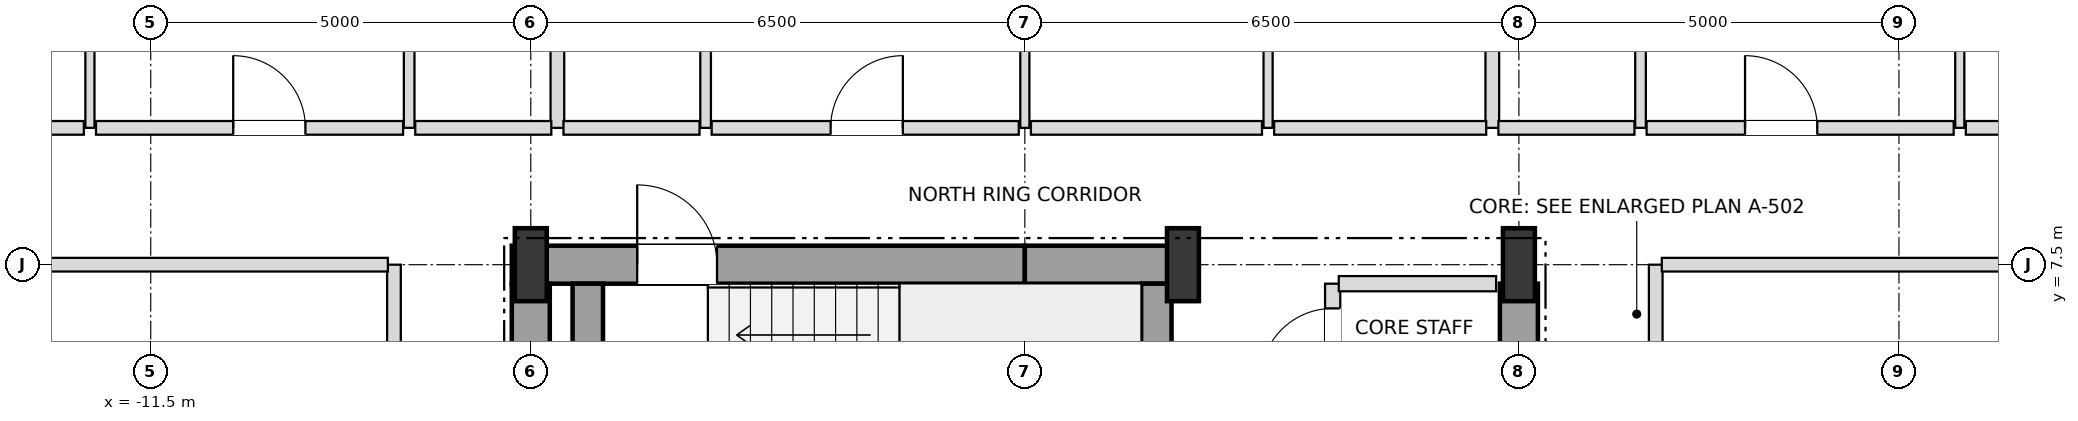
"""IFC4 building model, lengths in metres.
Left out: names, types, materials, properties, quantities, classifications, styles, units other than length and angle.
Written with IfcOpenShell. Run it as: python <this file> out.ifc"""

import sys

from ifc_helpers import new_model, si_unit, direction, frame, frame_2d, origin, origin_2d, place, context, subcontext, project, spatial, rectangle, i_section, extrude, element, fill, save


model = new_model("IFC4")
c1 = context("Model", 3, precision=1e-05, world=origin(), true_north=direction((0.0, 1.0)))
c2 = subcontext(c1, "Body", "Model", "MODEL_VIEW")
j1 = project(units=[si_unit("LENGTHUNIT", "METRE"), si_unit("PLANEANGLEUNIT", "RADIAN")], contexts=[c1])
p1 = place(None, origin())
s1 = spatial("IfcSite", under=j1, at=p1, CompositionType="ELEMENT")
p2 = place(p1, origin())
s2 = spatial("IfcBuilding", under=s1, at=p2, CompositionType="ELEMENT")
p3 = place(p2, frame((0.0, 0.0, 46.8)))
s3 = spatial("IfcBuildingStorey", under=s2, at=p3, CompositionType="ELEMENT", Elevation=46.8)
for number, where, z_axis, x_axis in (
    (1, (-6.5, 7.5, 0.0), (0.0, 0.0, 1.0), (1.0, 0.0, 0.0)),
    (2, (2.08, 7.5, 0.0), (0.0, 0.0, 1.0), (1.0, 0.0, 0.0)),
    (3, (6.5, 7.5, 0.0), (0.0, 0.0, 1.0), (1.0, 0.0, 0.0)),
):
    element("IfcColumn", number, at=place(p3, frame(where, z_axis=z_axis, x_axis=x_axis)), inside=s3, PredefinedType="COLUMN", context=c2, shape_type="SweptSolid", body=[
        extrude(i_section(OverallWidth=0.42, OverallDepth=0.96, WebThickness=0.022, FlangeThickness=0.034, at=origin_2d()), origin(), (0.0, 0.0, 1.0), 3.6),
    ])
p4 = place(p3, frame((-6.75, 7.5, 0.0), z_axis=(0.0, 0.0, 1.0), x_axis=(1.0, 0.0, 0.0)))
e4 = element("IfcWall", 4, at=p4, inside=s3, PredefinedType="SHEAR", context=c2, shape_type="SweptSolid", body=[
    extrude(rectangle(XDim=6.75, YDim=0.5, at=frame_2d((3.375, 0.0))), origin(), (0.0, 0.0, 1.0), 3.38),
])
p5 = place(p4, frame((1.65, 0.0, 0.0)))
e5 = element("IfcOpeningElement", 5, at=p5, cuts=e4, PredefinedType="OPENING", context=c2, shape_type="SweptSolid", body=[
    extrude(rectangle(XDim=1.05, YDim=2.15, at=frame_2d((0.525, 1.075))), frame((0.0, 0.26, 0.0), z_axis=(0.0, -1.0, 0.0), x_axis=(1.0, 0.0, 0.0)), (0.0, 0.0, 1.0), 0.52),
])
p6 = place(p3, frame((0.0, 7.5, 0.0), z_axis=(0.0, 0.0, 1.0), x_axis=(1.0, 0.0, 0.0)))
e6 = element("IfcWall", 6, at=p6, inside=s3, PredefinedType="SHEAR", context=c2, shape_type="SweptSolid", body=[
    extrude(rectangle(XDim=2.08, YDim=0.5, at=frame_2d((1.04, 0.0))), origin(), (0.0, 0.0, 1.0), 3.38),
])
for number, where, z_axis, x_axis in (
    (7, (-6.5, 3.95, 0.0), (0.0, 0.0, 1.0), (0.0, 1.0, 0.0)),
    (8, (6.5, 3.95, 0.0), (0.0, 0.0, 1.0), (0.0, 1.0, 0.0)),
):
    element("IfcWall", number, at=place(p3, frame(where, z_axis=z_axis, x_axis=x_axis)), inside=s3, PredefinedType="SHEAR", context=c2, shape_type="SweptSolid", body=[
        extrude(rectangle(XDim=3.3, YDim=0.5, at=frame_2d((1.65, 0.0))), origin(), (0.0, 0.0, 1.0), 3.38),
    ])
for number, where, z_axis, x_axis in (
    (9, (1.73, 3.95, 0.0), (0.0, 0.0, 1.0), (0.0, 1.0, 0.0)),
    (10, (-5.75, 3.95, 0.0), (0.0, 0.0, 1.0), (0.0, 1.0, 0.0)),
):
    element("IfcWall", number, at=place(p3, frame(where, z_axis=z_axis, x_axis=x_axis)), inside=s3, PredefinedType="SHEAR", context=c2, shape_type="SweptSolid", body=[
        extrude(rectangle(XDim=3.3, YDim=0.4, at=frame_2d((1.65, 0.0))), origin(), (0.0, 0.0, 1.0), 3.38),
    ])
p7 = place(p3, frame((-12.3, 9.3, 0.0), z_axis=(0.0, 0.0, 1.0), x_axis=(0.0, 1.0, 0.0)))
e11 = element("IfcWall", 11, at=p7, inside=s3, PredefinedType="PARTITIONING", context=c2, shape_type="SweptSolid", body=[
    extrude(rectangle(XDim=15.6, YDim=0.12, at=frame_2d((7.8, 0.0))), origin(), (0.0, 0.0, 1.0), 2.736),
])
p8 = place(p7, frame((4.325, 0.0, 0.0)))
e12 = element("IfcOpeningElement", 12, at=p8, cuts=e11, PredefinedType="OPENING", context=c2, shape_type="SweptSolid", body=[
    extrude(rectangle(XDim=0.95, YDim=2.1, at=frame_2d((0.475, 1.05))), frame((0.0, 0.07, 0.0), z_axis=(0.0, -1.0, 0.0), x_axis=(1.0, 0.0, 0.0)), (0.0, 0.0, 1.0), 0.14),
])
p9 = place(p7, frame((12.15, 0.0, 0.0)))
e13 = element("IfcOpeningElement", 13, at=p9, cuts=e11, PredefinedType="OPENING", context=c2, shape_type="SweptSolid", body=[
    extrude(rectangle(XDim=0.9, YDim=2.1, at=frame_2d((0.45, 1.05))), frame((0.0, 0.07, 0.0), z_axis=(0.0, -1.0, 0.0), x_axis=(1.0, 0.0, 0.0)), (0.0, 0.0, 1.0), 0.14),
])
p10 = place(p3, frame((-8.3, -7.5, 0.0), z_axis=(0.0, 0.0, 1.0), x_axis=(0.0, 1.0, 0.0)))
e14 = element("IfcWall", 14, at=p10, inside=s3, PredefinedType="PARTITIONING", context=c2, shape_type="SweptSolid", body=[
    extrude(rectangle(XDim=15.0, YDim=0.18, at=frame_2d((7.5, 0.0))), origin(), (0.0, 0.0, 1.0), 3.38),
])
p11 = place(p10, frame((3.475, 0.0, 0.0)))
e15 = element("IfcOpeningElement", 15, at=p11, cuts=e14, PredefinedType="OPENING", context=c2, shape_type="SweptSolid", body=[
    extrude(rectangle(XDim=0.95, YDim=2.15, at=frame_2d((0.475, 1.075))), frame((0.0, 0.1, 0.0), z_axis=(0.0, -1.0, 0.0), x_axis=(1.0, 0.0, 0.0)), (0.0, 0.0, 1.0), 0.2),
])
p12 = place(p3, frame((-8.1, 9.3, 0.0), z_axis=(0.0, 0.0, 1.0), x_axis=(0.0, 1.0, 0.0)))
e16 = element("IfcWall", 16, at=p12, inside=s3, PredefinedType="PARTITIONING", context=c2, shape_type="SweptSolid", body=[
    extrude(rectangle(XDim=9.6, YDim=0.14, at=frame_2d((4.8, 0.0))), origin(), (0.0, 0.0, 1.0), 2.816),
])
p13 = place(p12, frame((4.35, 0.0, 0.0)))
e17 = element("IfcOpeningElement", 17, at=p13, cuts=e16, PredefinedType="OPENING", context=c2, shape_type="SweptSolid", body=[
    extrude(rectangle(XDim=0.9, YDim=2.1, at=frame_2d((0.45, 1.05))), frame((0.0, 0.08, 0.0), z_axis=(0.0, -1.0, 0.0), x_axis=(1.0, 0.0, 0.0)), (0.0, 0.0, 1.0), 0.16),
])
p14 = place(p3, frame((-6.15, 9.3, 0.0), z_axis=(0.0, 0.0, 1.0), x_axis=(0.0, 1.0, 0.0)))
e18 = element("IfcWall", 18, at=p14, inside=s3, PredefinedType="PARTITIONING", context=c2, shape_type="SweptSolid", body=[
    extrude(rectangle(XDim=15.6, YDim=0.18, at=frame_2d((7.8, 0.0))), origin(), (0.0, 0.0, 1.0), 2.816),
])
p15 = place(p3, frame((-4.2, 9.3, 0.0), z_axis=(0.0, 0.0, 1.0), x_axis=(0.0, 1.0, 0.0)))
e19 = element("IfcWall", 19, at=p15, inside=s3, PredefinedType="PARTITIONING", context=c2, shape_type="SweptSolid", body=[
    extrude(rectangle(XDim=9.6, YDim=0.14, at=frame_2d((4.8, 0.0))), origin(), (0.0, 0.0, 1.0), 2.948),
])
p16 = place(p15, frame((4.35, 0.0, 0.0)))
e20 = element("IfcOpeningElement", 20, at=p16, cuts=e19, PredefinedType="OPENING", context=c2, shape_type="SweptSolid", body=[
    extrude(rectangle(XDim=0.9, YDim=2.1, at=frame_2d((0.45, 1.05))), frame((0.0, 0.08, 0.0), z_axis=(0.0, -1.0, 0.0), x_axis=(1.0, 0.0, 0.0)), (0.0, 0.0, 1.0), 0.16),
])
p17 = place(p3, frame((0.0, 9.3, 0.0), z_axis=(0.0, 0.0, 1.0), x_axis=(0.0, 1.0, 0.0)))
e21 = element("IfcWall", 21, at=p17, inside=s3, PredefinedType="PARTITIONING", context=c2, shape_type="SweptSolid", body=[
    extrude(rectangle(XDim=15.6, YDim=0.12, at=frame_2d((7.8, 0.0))), origin(), (0.0, 0.0, 1.0), 2.816),
])
p18 = place(p17, frame((4.325, 0.0, 0.0)))
e22 = element("IfcOpeningElement", 22, at=p18, cuts=e21, PredefinedType="OPENING", context=c2, shape_type="SweptSolid", body=[
    extrude(rectangle(XDim=0.95, YDim=2.1, at=frame_2d((0.475, 1.05))), frame((0.0, 0.07, 0.0), z_axis=(0.0, -1.0, 0.0), x_axis=(1.0, 0.0, 0.0)), (0.0, 0.0, 1.0), 0.14),
])
p19 = place(p17, frame((12.15, 0.0, 0.0)))
e23 = element("IfcOpeningElement", 23, at=p19, cuts=e21, PredefinedType="OPENING", context=c2, shape_type="SweptSolid", body=[
    extrude(rectangle(XDim=0.9, YDim=2.1, at=frame_2d((0.45, 1.05))), frame((0.0, 0.07, 0.0), z_axis=(0.0, -1.0, 0.0), x_axis=(1.0, 0.0, 0.0)), (0.0, 0.0, 1.0), 0.14),
])
p20 = place(p3, frame((3.2, 9.3, 0.0), z_axis=(0.0, 0.0, 1.0), x_axis=(0.0, 1.0, 0.0)))
e24 = element("IfcWall", 24, at=p20, inside=s3, PredefinedType="PARTITIONING", context=c2, shape_type="SweptSolid", body=[
    extrude(rectangle(XDim=15.6, YDim=0.12, at=frame_2d((7.8, 0.0))), origin(), (0.0, 0.0, 1.0), 2.816),
])
p21 = place(p20, frame((4.35, 0.0, 0.0)))
e25 = element("IfcOpeningElement", 25, at=p21, cuts=e24, PredefinedType="OPENING", context=c2, shape_type="SweptSolid", body=[
    extrude(rectangle(XDim=0.9, YDim=2.1, at=frame_2d((0.45, 1.05))), frame((0.0, 0.07, 0.0), z_axis=(0.0, -1.0, 0.0), x_axis=(1.0, 0.0, 0.0)), (0.0, 0.0, 1.0), 0.14),
])
p22 = place(p20, frame((12.15, 0.0, 0.0)))
e26 = element("IfcOpeningElement", 26, at=p22, cuts=e24, PredefinedType="OPENING", context=c2, shape_type="SweptSolid", body=[
    extrude(rectangle(XDim=0.9, YDim=2.1, at=frame_2d((0.45, 1.05))), frame((0.0, 0.07, 0.0), z_axis=(0.0, -1.0, 0.0), x_axis=(1.0, 0.0, 0.0)), (0.0, 0.0, 1.0), 0.14),
])
p23 = place(p3, frame((4.05, 4.2, 0.0), z_axis=(0.0, 0.0, 1.0), x_axis=(0.0, 1.0, 0.0)))
e27 = element("IfcWall", 27, at=p23, inside=s3, PredefinedType="SOLIDWALL", context=c2, shape_type="SweptSolid", body=[
    extrude(rectangle(XDim=3.05, YDim=0.2, at=frame_2d((1.525, 0.0))), origin(), (0.0, 0.0, 1.0), 3.38),
])
p24 = place(p23, frame((0.275, 0.0, 0.0)))
e28 = element("IfcOpeningElement", 28, at=p24, cuts=e27, PredefinedType="OPENING", context=c2, shape_type="SweptSolid", body=[
    extrude(rectangle(XDim=0.95, YDim=2.15, at=frame_2d((0.475, 1.075))), frame((0.0, 0.11, 0.0), z_axis=(0.0, -1.0, 0.0), x_axis=(1.0, 0.0, 0.0)), (0.0, 0.0, 1.0), 0.22),
])
p25 = place(p23, frame((1.775, 0.0, 0.0)))
e29 = element("IfcOpeningElement", 29, at=p25, cuts=e27, PredefinedType="OPENING", context=c2, shape_type="SweptSolid", body=[
    extrude(rectangle(XDim=0.95, YDim=2.15, at=frame_2d((0.475, 1.075))), frame((0.0, 0.11, 0.0), z_axis=(0.0, -1.0, 0.0), x_axis=(1.0, 0.0, 0.0)), (0.0, 0.0, 1.0), 0.22),
])
p26 = place(p3, frame((6.15, 9.3, 0.0), z_axis=(0.0, 0.0, 1.0), x_axis=(0.0, 1.0, 0.0)))
e30 = element("IfcWall", 30, at=p26, inside=s3, PredefinedType="PARTITIONING", context=c2, shape_type="SweptSolid", body=[
    extrude(rectangle(XDim=15.6, YDim=0.18, at=frame_2d((7.8, 0.0))), origin(), (0.0, 0.0, 1.0), 2.816),
])
p27 = place(p3, frame((8.1, 9.3, 0.0), z_axis=(0.0, 0.0, 1.0), x_axis=(0.0, 1.0, 0.0)))
e31 = element("IfcWall", 31, at=p27, inside=s3, PredefinedType="PARTITIONING", context=c2, shape_type="SweptSolid", body=[
    extrude(rectangle(XDim=9.6, YDim=0.14, at=frame_2d((4.8, 0.0))), origin(), (0.0, 0.0, 1.0), 2.816),
])
p28 = place(p27, frame((4.35, 0.0, 0.0)))
e32 = element("IfcOpeningElement", 32, at=p28, cuts=e31, PredefinedType="OPENING", context=c2, shape_type="SweptSolid", body=[
    extrude(rectangle(XDim=0.9, YDim=2.1, at=frame_2d((0.45, 1.05))), frame((0.0, 0.08, 0.0), z_axis=(0.0, -1.0, 0.0), x_axis=(1.0, 0.0, 0.0)), (0.0, 0.0, 1.0), 0.16),
])
p29 = place(p3, frame((8.3, -7.5, 0.0), z_axis=(0.0, 0.0, 1.0), x_axis=(0.0, 1.0, 0.0)))
e33 = element("IfcWall", 33, at=p29, inside=s3, PredefinedType="PARTITIONING", context=c2, shape_type="SweptSolid", body=[
    extrude(rectangle(XDim=15.0, YDim=0.18, at=frame_2d((7.5, 0.0))), origin(), (0.0, 0.0, 1.0), 3.38),
])
p30 = place(p29, frame((3.475, 0.0, 0.0)))
e34 = element("IfcOpeningElement", 34, at=p30, cuts=e33, PredefinedType="OPENING", context=c2, shape_type="SweptSolid", body=[
    extrude(rectangle(XDim=0.95, YDim=2.15, at=frame_2d((0.475, 1.075))), frame((0.0, 0.1, 0.0), z_axis=(0.0, -1.0, 0.0), x_axis=(1.0, 0.0, 0.0)), (0.0, 0.0, 1.0), 0.2),
])
p31 = place(p3, frame((12.3, 9.3, 0.0), z_axis=(0.0, 0.0, 1.0), x_axis=(0.0, 1.0, 0.0)))
e35 = element("IfcWall", 35, at=p31, inside=s3, PredefinedType="PARTITIONING", context=c2, shape_type="SweptSolid", body=[
    extrude(rectangle(XDim=15.6, YDim=0.12, at=frame_2d((7.8, 0.0))), origin(), (0.0, 0.0, 1.0), 2.736),
])
p32 = place(p31, frame((4.325, 0.0, 0.0)))
e36 = element("IfcOpeningElement", 36, at=p32, cuts=e35, PredefinedType="OPENING", context=c2, shape_type="SweptSolid", body=[
    extrude(rectangle(XDim=0.95, YDim=2.1, at=frame_2d((0.475, 1.05))), frame((0.0, 0.07, 0.0), z_axis=(0.0, -1.0, 0.0), x_axis=(1.0, 0.0, 0.0)), (0.0, 0.0, 1.0), 0.14),
])
p33 = place(p31, frame((12.15, 0.0, 0.0)))
e37 = element("IfcOpeningElement", 37, at=p33, cuts=e35, PredefinedType="OPENING", context=c2, shape_type="SweptSolid", body=[
    extrude(rectangle(XDim=0.9, YDim=2.1, at=frame_2d((0.45, 1.05))), frame((0.0, 0.07, 0.0), z_axis=(0.0, -1.0, 0.0), x_axis=(1.0, 0.0, 0.0)), (0.0, 0.0, 1.0), 0.14),
])
p34 = place(p3, frame((4.13, 7.25, 0.0), z_axis=(0.0, 0.0, 1.0), x_axis=(1.0, 0.0, 0.0)))
e38 = element("IfcWall", 38, at=p34, inside=s3, PredefinedType="SOLIDWALL", context=c2, shape_type="SweptSolid", body=[
    extrude(rectangle(XDim=2.07, YDim=0.2, at=frame_2d((1.035, 0.0))), origin(), (0.0, 0.0, 1.0), 3.38),
])
for number, where, z_axis, x_axis in (
    (39, (-16.02, 7.5, 0.0), (0.0, 0.0, 1.0), (1.0, 0.0, 0.0)),
    (40, (8.38, 7.5, 0.0), (0.0, 0.0, 1.0), (1.0, 0.0, 0.0)),
):
    element("IfcWall", number, at=place(p3, frame(where, z_axis=z_axis, x_axis=x_axis)), inside=s3, PredefinedType="PARTITIONING", context=c2, shape_type="SweptSolid", body=[
        extrude(rectangle(XDim=7.64, YDim=0.18, at=frame_2d((3.82, 0.0))), origin(), (0.0, 0.0, 1.0), 2.816),
    ])
p35 = place(p3, frame((-15.37, 9.3, 0.0), z_axis=(0.0, 0.0, 1.0), x_axis=(1.0, 0.0, 0.0)))
e41 = element("IfcWall", 41, at=p35, inside=s3, PredefinedType="PARTITIONING", context=c2, shape_type="SweptSolid", body=[
    extrude(rectangle(XDim=2.99, YDim=0.18, at=frame_2d((1.495, 0.0))), origin(), (0.0, 0.0, 1.0), 3.38),
])
p36 = place(p3, frame((-12.22, 9.3, 0.0), z_axis=(0.0, 0.0, 1.0), x_axis=(1.0, 0.0, 0.0)))
e42 = element("IfcWall", 42, at=p36, inside=s3, PredefinedType="PARTITIONING", context=c2, shape_type="SweptSolid", body=[
    extrude(rectangle(XDim=4.04, YDim=0.18, at=frame_2d((2.02, 0.0))), origin(), (0.0, 0.0, 1.0), 3.38),
])
p37 = place(p36, frame((1.805, 0.0, 0.0)))
e43 = element("IfcOpeningElement", 43, at=p37, cuts=e42, PredefinedType="OPENING", context=c2, shape_type="SweptSolid", body=[
    extrude(rectangle(XDim=0.95, YDim=2.15, at=frame_2d((0.475, 1.075))), frame((0.0, 0.1, 0.0), z_axis=(0.0, -1.0, 0.0), x_axis=(1.0, 0.0, 0.0)), (0.0, 0.0, 1.0), 0.2),
])
p38 = place(p3, frame((-8.02, 9.3, 0.0), z_axis=(0.0, 0.0, 1.0), x_axis=(1.0, 0.0, 0.0)))
e44 = element("IfcWall", 44, at=p38, inside=s3, PredefinedType="PARTITIONING", context=c2, shape_type="SweptSolid", body=[
    extrude(rectangle(XDim=1.79, YDim=0.18, at=frame_2d((0.895, 0.0))), origin(), (0.0, 0.0, 1.0), 2.816),
])
p39 = place(p3, frame((-6.07, 9.3, 0.0), z_axis=(0.0, 0.0, 1.0), x_axis=(1.0, 0.0, 0.0)))
e45 = element("IfcWall", 45, at=p39, inside=s3, PredefinedType="PARTITIONING", context=c2, shape_type="SweptSolid", body=[
    extrude(rectangle(XDim=1.79, YDim=0.18, at=frame_2d((0.895, 0.0))), origin(), (0.0, 0.0, 1.0), 3.38),
])
p40 = place(p3, frame((-4.12, 9.3, 0.0), z_axis=(0.0, 0.0, 1.0), x_axis=(1.0, 0.0, 0.0)))
e46 = element("IfcWall", 46, at=p40, inside=s3, PredefinedType="PARTITIONING", context=c2, shape_type="SweptSolid", body=[
    extrude(rectangle(XDim=4.04, YDim=0.18, at=frame_2d((2.02, 0.0))), origin(), (0.0, 0.0, 1.0), 3.38),
])
p41 = place(p40, frame((1.565, 0.0, 0.0)))
e47 = element("IfcOpeningElement", 47, at=p41, cuts=e46, PredefinedType="OPENING", context=c2, shape_type="SweptSolid", body=[
    extrude(rectangle(XDim=0.95, YDim=2.15, at=frame_2d((0.475, 1.075))), frame((0.0, 0.1, 0.0), z_axis=(0.0, -1.0, 0.0), x_axis=(1.0, 0.0, 0.0)), (0.0, 0.0, 1.0), 0.2),
])
p42 = place(p3, frame((0.08, 9.3, 0.0), z_axis=(0.0, 0.0, 1.0), x_axis=(1.0, 0.0, 0.0)))
e48 = element("IfcWall", 48, at=p42, inside=s3, PredefinedType="PARTITIONING", context=c2, shape_type="SweptSolid", body=[
    extrude(rectangle(XDim=3.04, YDim=0.18, at=frame_2d((1.52, 0.0))), origin(), (0.0, 0.0, 1.0), 3.38),
])
p43 = place(p3, frame((3.28, 9.3, 0.0), z_axis=(0.0, 0.0, 1.0), x_axis=(1.0, 0.0, 0.0)))
e49 = element("IfcWall", 49, at=p43, inside=s3, PredefinedType="PARTITIONING", context=c2, shape_type="SweptSolid", body=[
    extrude(rectangle(XDim=2.79, YDim=0.18, at=frame_2d((1.395, 0.0))), origin(), (0.0, 0.0, 1.0), 3.38),
])
p44 = place(p3, frame((6.23, 9.3, 0.0), z_axis=(0.0, 0.0, 1.0), x_axis=(1.0, 0.0, 0.0)))
e50 = element("IfcWall", 50, at=p44, inside=s3, PredefinedType="PARTITIONING", context=c2, shape_type="SweptSolid", body=[
    extrude(rectangle(XDim=1.79, YDim=0.18, at=frame_2d((0.895, 0.0))), origin(), (0.0, 0.0, 1.0), 2.816),
])
p45 = place(p3, frame((8.18, 9.3, 0.0), z_axis=(0.0, 0.0, 1.0), x_axis=(1.0, 0.0, 0.0)))
e51 = element("IfcWall", 51, at=p45, inside=s3, PredefinedType="PARTITIONING", context=c2, shape_type="SweptSolid", body=[
    extrude(rectangle(XDim=4.04, YDim=0.18, at=frame_2d((2.02, 0.0))), origin(), (0.0, 0.0, 1.0), 3.38),
])
p46 = place(p45, frame((1.295, 0.0, 0.0)))
e52 = element("IfcOpeningElement", 52, at=p46, cuts=e51, PredefinedType="OPENING", context=c2, shape_type="SweptSolid", body=[
    extrude(rectangle(XDim=0.95, YDim=2.15, at=frame_2d((0.475, 1.075))), frame((0.0, 0.1, 0.0), z_axis=(0.0, -1.0, 0.0), x_axis=(1.0, 0.0, 0.0)), (0.0, 0.0, 1.0), 0.2),
])
p47 = place(p3, frame((12.38, 9.3, 0.0), z_axis=(0.0, 0.0, 1.0), x_axis=(1.0, 0.0, 0.0)))
e53 = element("IfcWall", 53, at=p47, inside=s3, PredefinedType="PARTITIONING", context=c2, shape_type="SweptSolid", body=[
    extrude(rectangle(XDim=3.04, YDim=0.18, at=frame_2d((1.52, 0.0))), origin(), (0.0, 0.0, 1.0), 3.38),
])
p48 = place(p5, origin())
e54 = element("IfcDoor", 54, at=p48, inside=s3, OperationType="SINGLE_SWING_LEFT", PredefinedType="DOOR", context=c2, shape_type="SweptSolid", body=[
    extrude(rectangle(XDim=1.05, YDim=2.15, at=frame_2d((0.525, 1.075))), frame((0.0, 0.025, 0.0), z_axis=(0.0, -1.0, 0.0), x_axis=(1.0, 0.0, 0.0)), (0.0, 0.0, 1.0), 0.05),
])
fill(e5, e54)
p49 = place(p25, origin())
e55 = element("IfcDoor", 55, at=p49, inside=s3, OperationType="SINGLE_SWING_LEFT", PredefinedType="DOOR", context=c2, shape_type="SweptSolid", body=[
    extrude(rectangle(XDim=0.95, YDim=2.15, at=frame_2d((0.475, 1.075))), frame((0.0, 0.025, 0.0), z_axis=(0.0, -1.0, 0.0), x_axis=(1.0, 0.0, 0.0)), (0.0, 0.0, 1.0), 0.05),
])
fill(e29, e55)
p50 = place(p37, origin())
e56 = element("IfcDoor", 56, at=p50, inside=s3, OperationType="SINGLE_SWING_LEFT", PredefinedType="DOOR", context=c2, shape_type="SweptSolid", body=[
    extrude(rectangle(XDim=0.95, YDim=2.15, at=frame_2d((0.475, 1.075))), frame((0.0, 0.025, 0.0), z_axis=(0.0, -1.0, 0.0), x_axis=(1.0, 0.0, 0.0)), (0.0, 0.0, 1.0), 0.05),
])
fill(e43, e56)
p51 = place(p41, origin())
e57 = element("IfcDoor", 57, at=p51, inside=s3, OperationType="SINGLE_SWING_RIGHT", PredefinedType="DOOR", context=c2, shape_type="SweptSolid", body=[
    extrude(rectangle(XDim=0.95, YDim=2.15, at=frame_2d((0.475, 1.075))), frame((0.0, 0.025, 0.0), z_axis=(0.0, -1.0, 0.0), x_axis=(1.0, 0.0, 0.0)), (0.0, 0.0, 1.0), 0.05),
])
fill(e47, e57)
p52 = place(p46, origin())
e58 = element("IfcDoor", 58, at=p52, inside=s3, OperationType="SINGLE_SWING_LEFT", PredefinedType="DOOR", context=c2, shape_type="SweptSolid", body=[
    extrude(rectangle(XDim=0.95, YDim=2.15, at=frame_2d((0.475, 1.075))), frame((0.0, 0.025, 0.0), z_axis=(0.0, -1.0, 0.0), x_axis=(1.0, 0.0, 0.0)), (0.0, 0.0, 1.0), 0.05),
])
fill(e52, e58)
save(model, sys.argv[1])
